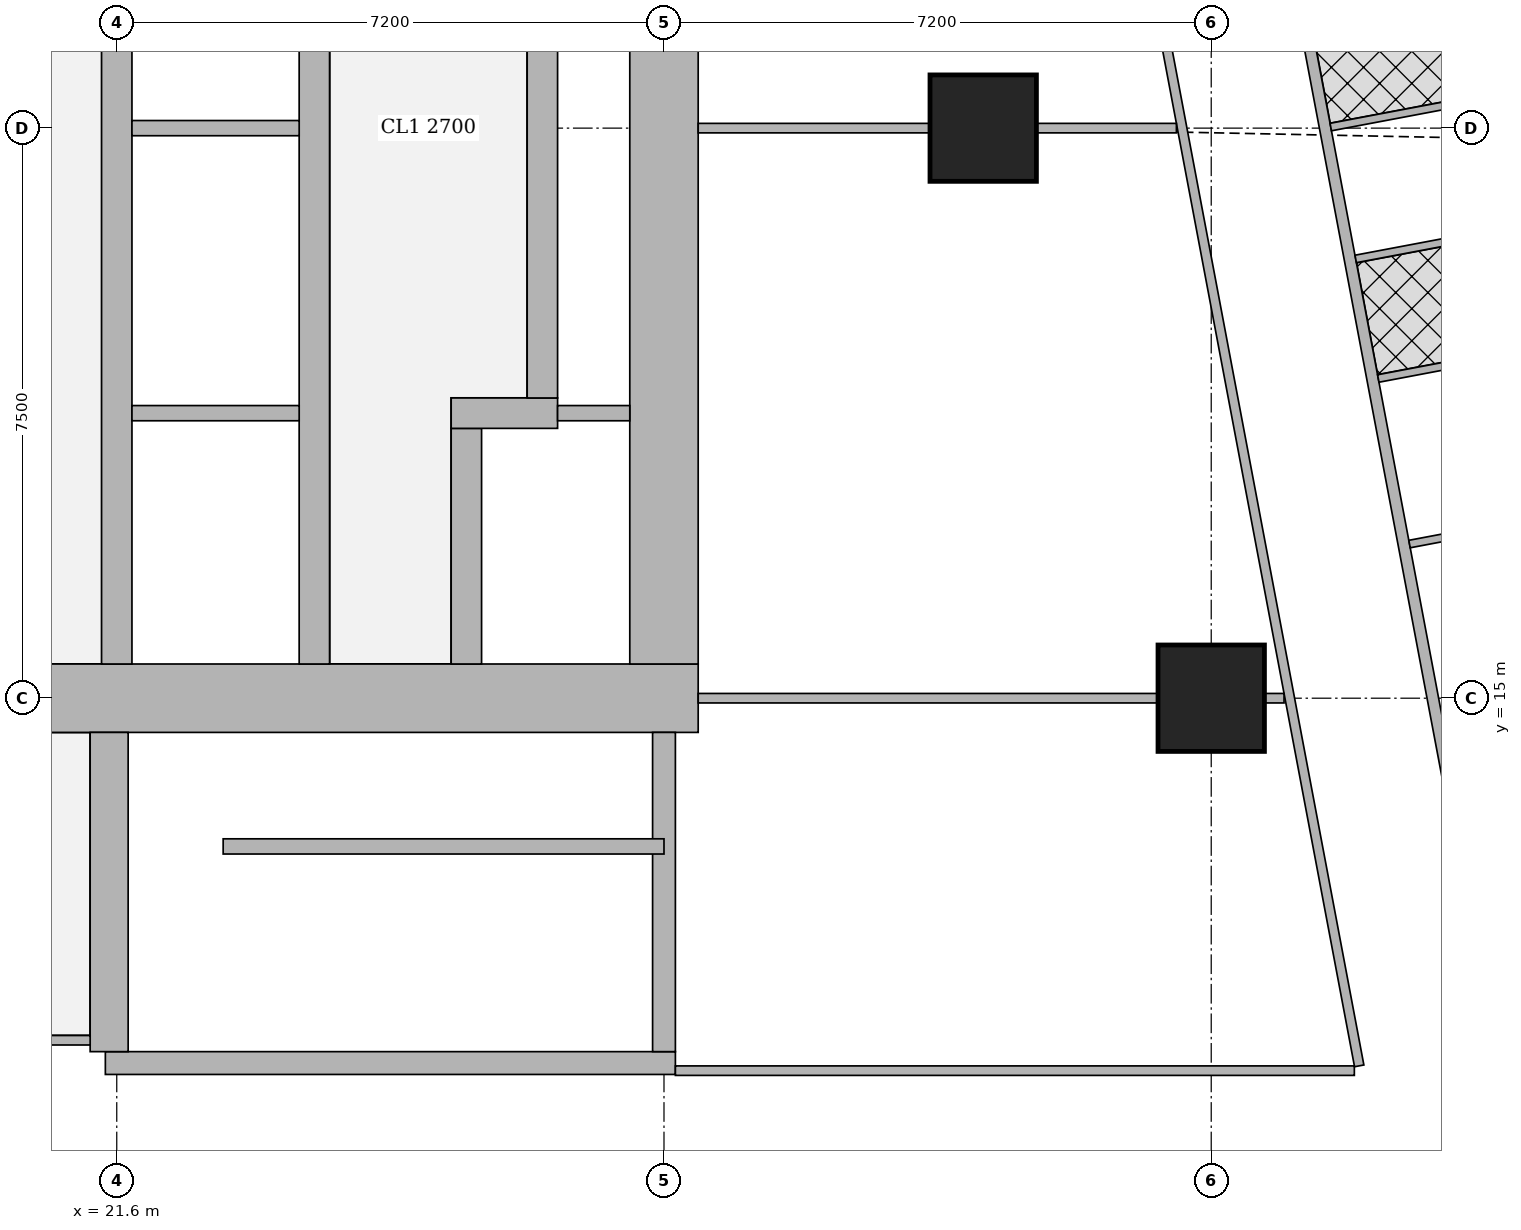
"""IFC4 building model, lengths in metres.
Left out: names, types, materials, properties, quantities, classifications, styles, units other than length and angle.
Written with IfcOpenShell. Run it as: python <this file> out.ifc"""

import sys

from ifc_helpers import new_model, si_unit, direction, frame, frame_2d, origin, origin_2d, place, context, subcontext, project, spatial, rectangle, extrude, element, fill, save


model = new_model("IFC4")
c1 = context("Model", 3, precision=1e-05, world=origin(), true_north=direction((0.0, 1.0)))
c2 = subcontext(c1, "Body", "Model", "MODEL_VIEW")
j1 = project(units=[si_unit("LENGTHUNIT", "METRE"), si_unit("PLANEANGLEUNIT", "RADIAN")], contexts=[c1])
p1 = place(None, origin())
s1 = spatial("IfcSite", under=j1, at=p1, CompositionType="ELEMENT")
p2 = place(p1, origin())
s2 = spatial("IfcBuilding", under=s1, at=p2, CompositionType="ELEMENT")
p3 = place(p2, frame((0.0, 0.0, 274.1)))
s3 = spatial("IfcBuildingStorey", under=s2, at=p3, CompositionType="ELEMENT", Elevation=274.1)
for number, where, z_axis, x_axis in (
    (1, (36.0, 15.0, 0.0), (0.0, 0.0, 1.0), (1.0, 0.0, 0.0)),
    (2, (33.0, 22.5, 0.0), (0.0, 0.0, 1.0), (1.0, 0.0, 0.0)),
):
    element("IfcColumn", number, at=place(p3, frame(where, z_axis=z_axis, x_axis=x_axis)), inside=s3, PredefinedType="COLUMN", context=c2, shape_type="SweptSolid", body=[
        extrude(rectangle(XDim=1.4, YDim=1.4, at=origin_2d()), origin(), (0.0, 0.0, 1.0), 3.75),
    ])
p4 = place(p3, frame((13.95, 15.0, 0.0), z_axis=(0.0, 0.0, 1.0), x_axis=(1.0, 0.0, 0.0)))
e3 = element("IfcWall", 3, at=p4, inside=s3, PredefinedType="SHEAR", context=c2, shape_type="SweptSolid", body=[
    extrude(rectangle(XDim=15.3, YDim=0.9, at=frame_2d((7.65, 0.0))), origin(), (0.0, 0.0, 1.0), 3.75),
])
p5 = place(p4, frame((4.45, 0.0, 0.0)))
e4 = element("IfcOpeningElement", 4, at=p5, cuts=e3, PredefinedType="OPENING", context=c2, shape_type="SweptSolid", body=[
    extrude(rectangle(XDim=1.8, YDim=2.1, at=frame_2d((0.9, 1.05))), frame((0.0, 0.46, 0.0), z_axis=(0.0, -1.0, 0.0), x_axis=(1.0, 0.0, 0.0)), (0.0, 0.0, 1.0), 0.92),
])
p6 = place(p4, frame((10.7, 0.0, 0.0)))
e5 = element("IfcOpeningElement", 5, at=p6, cuts=e3, PredefinedType="OPENING", context=c2, shape_type="SweptSolid", body=[
    extrude(rectangle(XDim=1.1, YDim=2.1, at=frame_2d((0.55, 1.05))), frame((0.0, 0.46, 0.0), z_axis=(0.0, -1.0, 0.0), x_axis=(1.0, 0.0, 0.0)), (0.0, 0.0, 1.0), 0.92),
])
p7 = place(p3, frame((28.8, 15.45, 0.0), z_axis=(0.0, 0.0, 1.0), x_axis=(0.0, 1.0, 0.0)))
e6 = element("IfcWall", 6, at=p7, inside=s3, PredefinedType="SHEAR", context=c2, shape_type="SweptSolid", body=[
    extrude(rectangle(XDim=14.1, YDim=0.9, at=frame_2d((7.05, 0.0))), origin(), (0.0, 0.0, 1.0), 3.75),
])
p8 = place(p3, frame((21.6, 15.45, 0.0), z_axis=(0.0, 0.0, 1.0), x_axis=(0.0, 1.0, 0.0)))
e7 = element("IfcWall", 7, at=p8, inside=s3, PredefinedType="SHEAR", context=c2, shape_type="SweptSolid", body=[
    extrude(rectangle(XDim=14.1, YDim=0.4, at=frame_2d((7.05, 0.0))), origin(), (0.0, 0.0, 1.0), 3.75),
])
p9 = place(p8, frame((0.875, 0.0, 0.0)))
e8 = element("IfcOpeningElement", 8, at=p9, cuts=e7, PredefinedType="OPENING", context=c2, shape_type="SweptSolid", body=[
    extrude(rectangle(XDim=1.1, YDim=2.1, at=frame_2d((0.55, 1.05))), frame((0.0, 0.21, 0.0), z_axis=(0.0, -1.0, 0.0), x_axis=(1.0, 0.0, 0.0)), (0.0, 0.0, 1.0), 0.42),
])
p10 = place(p8, frame((4.625, 0.0, 0.0)))
e9 = element("IfcOpeningElement", 9, at=p10, cuts=e7, PredefinedType="OPENING", context=c2, shape_type="SweptSolid", body=[
    extrude(rectangle(XDim=1.1, YDim=2.1, at=frame_2d((0.55, 1.05))), frame((0.0, 0.21, 0.0), z_axis=(0.0, -1.0, 0.0), x_axis=(1.0, 0.0, 0.0)), (0.0, 0.0, 1.0), 0.42),
])
p11 = place(p8, frame((8.375, 0.0, 0.0)))
e10 = element("IfcOpeningElement", 10, at=p11, cuts=e7, PredefinedType="OPENING", context=c2, shape_type="SweptSolid", body=[
    extrude(rectangle(XDim=1.1, YDim=2.1, at=frame_2d((0.55, 1.05))), frame((0.0, 0.21, 0.0), z_axis=(0.0, -1.0, 0.0), x_axis=(1.0, 0.0, 0.0)), (0.0, 0.0, 1.0), 0.42),
])
p12 = place(p8, frame((12.125, 0.0, 0.0)))
e11 = element("IfcOpeningElement", 11, at=p12, cuts=e7, PredefinedType="OPENING", context=c2, shape_type="SweptSolid", body=[
    extrude(rectangle(XDim=1.1, YDim=2.1, at=frame_2d((0.55, 1.05))), frame((0.0, 0.21, 0.0), z_axis=(0.0, -1.0, 0.0), x_axis=(1.0, 0.0, 0.0)), (0.0, 0.0, 1.0), 0.42),
])
p13 = place(p3, frame((24.2, 15.45, 0.0), z_axis=(0.0, 0.0, 1.0), x_axis=(0.0, 1.0, 0.0)))
e12 = element("IfcWall", 12, at=p13, inside=s3, PredefinedType="SHEAR", context=c2, shape_type="SweptSolid", body=[
    extrude(rectangle(XDim=14.1, YDim=0.4, at=frame_2d((7.05, 0.0))), origin(), (0.0, 0.0, 1.0), 3.75),
])
p14 = place(p3, frame((26.2, 15.45, 0.0), z_axis=(0.0, 0.0, 1.0), x_axis=(0.0, 1.0, 0.0)))
e13 = element("IfcWall", 13, at=p14, inside=s3, PredefinedType="SHEAR", context=c2, shape_type="SweptSolid", body=[
    extrude(rectangle(XDim=3.1, YDim=0.4, at=frame_2d((1.55, 0.0))), origin(), (0.0, 0.0, 1.0), 3.75),
])
p15 = place(p14, frame((0.825, 0.0, 0.0)))
e14 = element("IfcOpeningElement", 14, at=p15, cuts=e13, PredefinedType="OPENING", context=c2, shape_type="SweptSolid", body=[
    extrude(rectangle(XDim=1.2, YDim=2.1, at=frame_2d((0.6, 1.05))), frame((0.0, 0.21, 0.0), z_axis=(0.0, -1.0, 0.0), x_axis=(1.0, 0.0, 0.0)), (0.0, 0.0, 1.0), 0.42),
])
p16 = place(p3, frame((26.0, 18.75, 0.0), z_axis=(0.0, 0.0, 1.0), x_axis=(1.0, 0.0, 0.0)))
e15 = element("IfcWall", 15, at=p16, inside=s3, PredefinedType="SHEAR", context=c2, shape_type="SweptSolid", body=[
    extrude(rectangle(XDim=1.4, YDim=0.4, at=frame_2d((0.7, 0.0))), origin(), (0.0, 0.0, 1.0), 3.75),
])
p17 = place(p3, frame((27.2, 18.95, 0.0), z_axis=(0.0, 0.0, 1.0), x_axis=(0.0, 1.0, 0.0)))
e16 = element("IfcWall", 16, at=p17, inside=s3, PredefinedType="SHEAR", context=c2, shape_type="SweptSolid", body=[
    extrude(rectangle(XDim=7.1, YDim=0.4, at=frame_2d((3.55, 0.0))), origin(), (0.0, 0.0, 1.0), 3.75),
])
p18 = place(p3, frame((21.45, 10.2, 0.0), z_axis=(0.0, 0.0, 1.0), x_axis=(1.0, 0.0, 0.0)))
e17 = element("IfcWall", 17, at=p18, inside=s3, PredefinedType="SHEAR", context=c2, shape_type="SweptSolid", body=[
    extrude(rectangle(XDim=7.5, YDim=0.3, at=frame_2d((3.75, 0.0))), origin(), (0.0, 0.0, 1.0), 3.75),
])
p19 = place(p18, frame((1.2, 0.0, 0.0)))
e18 = element("IfcOpeningElement", 18, at=p19, cuts=e17, PredefinedType="OPENING", context=c2, shape_type="SweptSolid", body=[
    extrude(rectangle(XDim=1.1, YDim=2.1, at=frame_2d((0.55, 1.05))), frame((0.0, 0.16, 0.0), z_axis=(0.0, -1.0, 0.0), x_axis=(1.0, 0.0, 0.0)), (0.0, 0.0, 1.0), 0.32),
])
p20 = place(p3, frame((21.5, 10.35, 0.0), z_axis=(0.0, 0.0, 1.0), x_axis=(0.0, 1.0, 0.0)))
e19 = element("IfcWall", 19, at=p20, inside=s3, PredefinedType="SHEAR", context=c2, shape_type="SweptSolid", body=[
    extrude(rectangle(XDim=4.2, YDim=0.5, at=frame_2d((2.1, 0.0))), origin(), (0.0, 0.0, 1.0), 3.75),
])
p21 = place(p3, frame((28.8, 10.35, 0.0), z_axis=(0.0, 0.0, 1.0), x_axis=(0.0, 1.0, 0.0)))
e20 = element("IfcWall", 20, at=p21, inside=s3, PredefinedType="SHEAR", context=c2, shape_type="SweptSolid", body=[
    extrude(rectangle(XDim=4.2, YDim=0.3, at=frame_2d((2.1, 0.0))), origin(), (0.0, 0.0, 1.0), 3.75),
])
p22 = place(p3, frame((33.781, 42.186, 0.0), z_axis=(0.0, 0.0, 1.0), x_axis=(0.185593518645, -0.9826266055, 0.0)))
e21 = element("IfcWall", 21, at=p22, inside=s3, PredefinedType="SOLIDWALL", context=c2, shape_type="SweptSolid", body=[
    extrude(rectangle(XDim=35.961, YDim=0.15, at=frame_2d((17.98, 0.0))), origin(), (0.0, 0.0, 1.0), 2.5),
])
p23 = place(p22, frame((11.76, 0.0, 0.0)))
e22 = element("IfcOpeningElement", 22, at=p23, cuts=e21, PredefinedType="OPENING", context=c2, shape_type="SweptSolid", body=[
    extrude(rectangle(XDim=1.0, YDim=2.1, at=frame_2d((0.5, 1.05))), frame((0.0, 0.085, 0.0), z_axis=(0.0, -1.0, 0.0), x_axis=(1.0, 0.0, 0.0)), (0.0, 0.0, 1.0), 0.17),
])
p24 = place(p22, frame((15.576, 0.0, 0.0)))
e23 = element("IfcOpeningElement", 23, at=p24, cuts=e21, PredefinedType="OPENING", context=c2, shape_type="SweptSolid", body=[
    extrude(rectangle(XDim=1.0, YDim=2.1, at=frame_2d((0.5, 1.05))), frame((0.0, 0.085, 0.0), z_axis=(0.0, -1.0, 0.0), x_axis=(1.0, 0.0, 0.0)), (0.0, 0.0, 1.0), 0.17),
])
p25 = place(p22, frame((30.502, 0.0, 0.0)))
e24 = element("IfcOpeningElement", 24, at=p25, cuts=e21, PredefinedType="OPENING", context=c2, shape_type="SweptSolid", body=[
    extrude(rectangle(XDim=1.0, YDim=2.1, at=frame_2d((0.5, 1.05))), frame((0.0, 0.085, 0.0), z_axis=(0.0, -1.0, 0.0), x_axis=(1.0, 0.0, 0.0)), (0.0, 0.0, 1.0), 0.17),
])
p26 = place(p3, frame((41.365, 21.433, 0.0), z_axis=(0.0, 0.0, 1.0), x_axis=(-0.982638553676, -0.185530247748, 0.0)))
e25 = element("IfcWall", 25, at=p26, inside=s3, PredefinedType="PARTITIONING", context=c2, shape_type="SweptSolid", body=[
    extrude(rectangle(XDim=3.525, YDim=0.1, at=frame_2d((1.763, 0.0))), origin(), (0.0, 0.0, 1.0), 3.5),
])
p27 = place(p3, frame((42.073, 17.682, 0.0), z_axis=(0.0, 0.0, 1.0), x_axis=(-0.98265117712, -0.185463376723, 0.0)))
e26 = element("IfcWall", 26, at=p27, inside=s3, PredefinedType="PARTITIONING", context=c2, shape_type="SweptSolid", body=[
    extrude(rectangle(XDim=3.525, YDim=0.1, at=frame_2d((1.763, 0.0))), origin(), (0.0, 0.0, 1.0), 3.5),
])
p28 = place(p27, frame((1.325, 0.0, 0.0)))
e27 = element("IfcOpeningElement", 27, at=p28, cuts=e26, PredefinedType="OPENING", context=c2, shape_type="SweptSolid", body=[
    extrude(rectangle(XDim=0.9, YDim=2.1, at=frame_2d((0.45, 1.05))), frame((0.0, 0.06, 0.0), z_axis=(0.0, -1.0, 0.0), x_axis=(1.0, 0.0, 0.0)), (0.0, 0.0, 1.0), 0.12),
])
p29 = place(p3, frame((41.037, 23.168, 0.0), z_axis=(0.0, 0.0, 1.0), x_axis=(-0.982638553676, -0.185530247748, 0.0)))
e28 = element("IfcWall", 28, at=p29, inside=s3, PredefinedType="PARTITIONING", context=c2, shape_type="SweptSolid", body=[
    extrude(rectangle(XDim=3.525, YDim=0.1, at=frame_2d((1.763, 0.0))), origin(), (0.0, 0.0, 1.0), 2.5),
])
p30 = place(p3, frame((41.662, 19.861, 0.0), z_axis=(0.0, 0.0, 1.0), x_axis=(-0.982588017646, -0.185797706064, 0.0)))
e29 = element("IfcWall", 29, at=p30, inside=s3, PredefinedType="PARTITIONING", context=c2, shape_type="SweptSolid", body=[
    extrude(rectangle(XDim=3.525, YDim=0.1, at=frame_2d((1.763, 0.0))), origin(), (0.0, 0.0, 1.0), 3.5),
])
p31 = place(p3, frame((13.75, 10.5, 0.0), z_axis=(0.0, 0.0, 1.0), x_axis=(1.0, 0.0, 0.0)))
e30 = element("IfcWall", 30, at=p31, inside=s3, PredefinedType="PARTITIONING", context=c2, shape_type="SweptSolid", body=[
    extrude(rectangle(XDim=7.5, YDim=0.125, at=frame_2d((3.75, 0.0))), origin(), (0.0, 0.0, 1.0), 3.5),
])
p32 = place(p31, frame((4.245, 0.0, 0.0)))
e31 = element("IfcOpeningElement", 31, at=p32, cuts=e30, PredefinedType="OPENING", context=c2, shape_type="SweptSolid", body=[
    extrude(rectangle(XDim=1.8, YDim=2.1, at=frame_2d((0.9, 1.05))), frame((0.0, 0.073, 0.0), z_axis=(0.0, -1.0, 0.0), x_axis=(1.0, 0.0, 0.0)), (0.0, 0.0, 1.0), 0.145),
])
p33 = place(p3, frame((28.95, 10.1, 0.0), z_axis=(0.0, 0.0, 1.0), x_axis=(1.0, 0.0, 0.0)))
e32 = element("IfcWall", 32, at=p33, inside=s3, PredefinedType="PARTITIONING", context=c2, shape_type="SweptSolid", body=[
    extrude(rectangle(XDim=8.933, YDim=0.125, at=frame_2d((4.467, 0.0))), origin(), (0.0, 0.0, 1.0), 3.5),
])
p34 = place(p3, frame((37.947, 10.163, 0.0), z_axis=(0.0, 0.0, 1.0), x_axis=(-0.185572770922, 0.982630523998, 0.0)))
e33 = element("IfcWall", 33, at=p34, inside=s3, PredefinedType="PARTITIONING", context=c2, shape_type="SweptSolid", body=[
    extrude(rectangle(XDim=25.111, YDim=0.125, at=frame_2d((12.556, 0.0))), origin(), (0.0, 0.0, 1.0), 2.5),
])
p35 = place(p34, frame((0.708, 0.0, 0.0)))
e34 = element("IfcOpeningElement", 34, at=p35, cuts=e33, PredefinedType="OPENING", context=c2, shape_type="SweptSolid", body=[
    extrude(rectangle(XDim=1.0, YDim=2.1, at=frame_2d((0.5, 1.05))), frame((0.0, 0.073, 0.0), z_axis=(0.0, -1.0, 0.0), x_axis=(1.0, 0.0, 0.0)), (0.0, 0.0, 1.0), 0.145),
])
p36 = place(p34, frame((5.9, 0.0, 0.0)))
e35 = element("IfcOpeningElement", 35, at=p36, cuts=e33, PredefinedType="OPENING", context=c2, shape_type="SweptSolid", body=[
    extrude(rectangle(XDim=1.0, YDim=2.1, at=frame_2d((0.5, 1.05))), frame((0.0, 0.073, 0.0), z_axis=(0.0, -1.0, 0.0), x_axis=(1.0, 0.0, 0.0)), (0.0, 0.0, 1.0), 0.145),
])
p37 = place(p34, frame((13.378, 0.0, 0.0)))
e36 = element("IfcOpeningElement", 36, at=p37, cuts=e33, PredefinedType="OPENING", context=c2, shape_type="SweptSolid", body=[
    extrude(rectangle(XDim=1.0, YDim=2.1, at=frame_2d((0.5, 1.05))), frame((0.0, 0.073, 0.0), z_axis=(0.0, -1.0, 0.0), x_axis=(1.0, 0.0, 0.0)), (0.0, 0.0, 1.0), 0.145),
])
p38 = place(p34, frame((21.15, 0.0, 0.0)))
e37 = element("IfcOpeningElement", 37, at=p38, cuts=e33, PredefinedType="OPENING", context=c2, shape_type="SweptSolid", body=[
    extrude(rectangle(XDim=1.0, YDim=2.1, at=frame_2d((0.5, 1.05))), frame((0.0, 0.073, 0.0), z_axis=(0.0, -1.0, 0.0), x_axis=(1.0, 0.0, 0.0)), (0.0, 0.0, 1.0), 0.145),
])
p39 = place(p3, frame((29.25, 15.0, 0.0), z_axis=(0.0, 0.0, 1.0), x_axis=(1.0, 0.0, 0.0)))
e38 = element("IfcWall", 38, at=p39, inside=s3, PredefinedType="PARTITIONING", context=c2, shape_type="SweptSolid", body=[
    extrude(rectangle(XDim=6.049, YDim=0.125, at=frame_2d((3.024, 0.0))), origin(), (0.0, 0.0, 1.0), 3.5),
])
p40 = place(p3, frame((36.701, 15.0, 0.0), z_axis=(0.0, 0.0, 1.0), x_axis=(1.0, 0.0, 0.0)))
e39 = element("IfcWall", 39, at=p40, inside=s3, PredefinedType="PARTITIONING", context=c2, shape_type="SweptSolid", body=[
    extrude(rectangle(XDim=0.257, YDim=0.125, at=frame_2d((0.128, 0.0))), origin(), (0.0, 0.0, 1.0), 3.5),
])
p41 = place(p3, frame((29.25, 22.5, 0.0), z_axis=(0.0, 0.0, 1.0), x_axis=(1.0, 0.0, 0.0)))
e40 = element("IfcWall", 40, at=p41, inside=s3, PredefinedType="PARTITIONING", context=c2, shape_type="SweptSolid", body=[
    extrude(rectangle(XDim=3.049, YDim=0.125, at=frame_2d((1.524, 0.0))), origin(), (0.0, 0.0, 1.0), 3.5),
])
p42 = place(p3, frame((33.701, 22.5, 0.0), z_axis=(0.0, 0.0, 1.0), x_axis=(1.0, 0.0, 0.0)))
e41 = element("IfcWall", 41, at=p42, inside=s3, PredefinedType="PARTITIONING", context=c2, shape_type="SweptSolid", body=[
    extrude(rectangle(XDim=1.841, YDim=0.125, at=frame_2d((0.92, 0.0))), origin(), (0.0, 0.0, 1.0), 2.5),
])
p43 = place(p3, frame((23.0, 13.05, 0.0), z_axis=(0.0, 0.0, 1.0), x_axis=(1.0, 0.0, 0.0)))
e42 = element("IfcWall", 42, at=p43, inside=s3, PredefinedType="SHEAR", context=c2, shape_type="SweptSolid", body=[
    extrude(rectangle(XDim=5.8, YDim=0.2, at=frame_2d((2.9, 0.0))), origin(), (0.0, 0.0, 1.0), 3.75),
])
for number, where, z_axis, x_axis in (
    (43, (21.8, 18.75, 0.0), (0.0, 0.0, 1.0), (1.0, 0.0, 0.0)),
    (44, (21.8, 22.5, 0.0), (0.0, 0.0, 1.0), (1.0, 0.0, 0.0)),
):
    element("IfcWall", number, at=place(p3, frame(where, z_axis=z_axis, x_axis=x_axis)), inside=s3, PredefinedType="SOLIDWALL", context=c2, shape_type="SweptSolid", body=[
        extrude(rectangle(XDim=2.2, YDim=0.2, at=frame_2d((1.1, 0.0))), origin(), (0.0, 0.0, 1.0), 3.5),
    ])
p44 = place(p3, frame((27.4, 18.75, 0.0), z_axis=(0.0, 0.0, 1.0), x_axis=(1.0, 0.0, 0.0)))
e45 = element("IfcWall", 45, at=p44, inside=s3, PredefinedType="SOLIDWALL", context=c2, shape_type="SweptSolid", body=[
    extrude(rectangle(XDim=0.95, YDim=0.2, at=frame_2d((0.475, 0.0))), origin(), (0.0, 0.0, 1.0), 3.5),
])
p45 = place(p35, origin())
e46 = element("IfcDoor", 46, at=p45, inside=s3, OperationType="SINGLE_SWING_LEFT", PredefinedType="DOOR", context=c2, shape_type="SweptSolid", body=[
    extrude(rectangle(XDim=1.0, YDim=2.1, at=frame_2d((0.5, 1.05))), frame((0.0, 0.025, 0.0), z_axis=(0.0, -1.0, 0.0), x_axis=(1.0, 0.0, 0.0)), (0.0, 0.0, 1.0), 0.05),
])
fill(e34, e46)
p46 = place(p36, origin())
e47 = element("IfcDoor", 47, at=p46, inside=s3, OperationType="SINGLE_SWING_LEFT", PredefinedType="DOOR", context=c2, shape_type="SweptSolid", body=[
    extrude(rectangle(XDim=1.0, YDim=2.1, at=frame_2d((0.5, 1.05))), frame((0.0, 0.025, 0.0), z_axis=(0.0, -1.0, 0.0), x_axis=(1.0, 0.0, 0.0)), (0.0, 0.0, 1.0), 0.05),
])
fill(e35, e47)
p47 = place(p37, origin())
e48 = element("IfcDoor", 48, at=p47, inside=s3, OperationType="SINGLE_SWING_LEFT", PredefinedType="DOOR", context=c2, shape_type="SweptSolid", body=[
    extrude(rectangle(XDim=1.0, YDim=2.1, at=frame_2d((0.5, 1.05))), frame((0.0, 0.025, 0.0), z_axis=(0.0, -1.0, 0.0), x_axis=(1.0, 0.0, 0.0)), (0.0, 0.0, 1.0), 0.05),
])
fill(e36, e48)
p48 = place(p6, origin())
e49 = element("IfcDoor", 49, at=p48, inside=s3, OperationType="SINGLE_SWING_RIGHT", PredefinedType="DOOR", context=c2, shape_type="SweptSolid", body=[
    extrude(rectangle(XDim=1.1, YDim=2.1, at=frame_2d((0.55, 1.05))), frame((0.0, 0.025, 0.0), z_axis=(0.0, -1.0, 0.0), x_axis=(1.0, 0.0, 0.0)), (0.0, 0.0, 1.0), 0.05),
])
fill(e5, e49)
p49 = place(p15, origin())
e50 = element("IfcDoor", 50, at=p49, inside=s3, OperationType="DOUBLE_DOOR_SLIDING", PredefinedType="DOOR", context=c2, shape_type="SweptSolid", body=[
    extrude(rectangle(XDim=1.2, YDim=2.1, at=frame_2d((0.6, 1.05))), frame((0.0, 0.025, 0.0), z_axis=(0.0, -1.0, 0.0), x_axis=(1.0, 0.0, 0.0)), (0.0, 0.0, 1.0), 0.05),
])
fill(e14, e50)
p50 = place(p9, origin())
e51 = element("IfcDoor", 51, at=p50, inside=s3, OperationType="DOUBLE_DOOR_SLIDING", PredefinedType="DOOR", context=c2, shape_type="SweptSolid", body=[
    extrude(rectangle(XDim=1.1, YDim=2.1, at=frame_2d((0.55, 1.05))), frame((0.0, 0.025, 0.0), z_axis=(0.0, -1.0, 0.0), x_axis=(1.0, 0.0, 0.0)), (0.0, 0.0, 1.0), 0.05),
])
fill(e8, e51)
p51 = place(p10, origin())
e52 = element("IfcDoor", 52, at=p51, inside=s3, OperationType="DOUBLE_DOOR_SLIDING", PredefinedType="DOOR", context=c2, shape_type="SweptSolid", body=[
    extrude(rectangle(XDim=1.1, YDim=2.1, at=frame_2d((0.55, 1.05))), frame((0.0, 0.025, 0.0), z_axis=(0.0, -1.0, 0.0), x_axis=(1.0, 0.0, 0.0)), (0.0, 0.0, 1.0), 0.05),
])
fill(e9, e52)
p52 = place(p19, origin())
e53 = element("IfcDoor", 53, at=p52, inside=s3, OperationType="SINGLE_SWING_LEFT", PredefinedType="DOOR", context=c2, shape_type="SweptSolid", body=[
    extrude(rectangle(XDim=1.1, YDim=2.1, at=frame_2d((0.55, 1.05))), frame((0.0, 0.025, 0.0), z_axis=(0.0, -1.0, 0.0), x_axis=(1.0, 0.0, 0.0)), (0.0, 0.0, 1.0), 0.05),
])
fill(e18, e53)
save(model, sys.argv[1])
